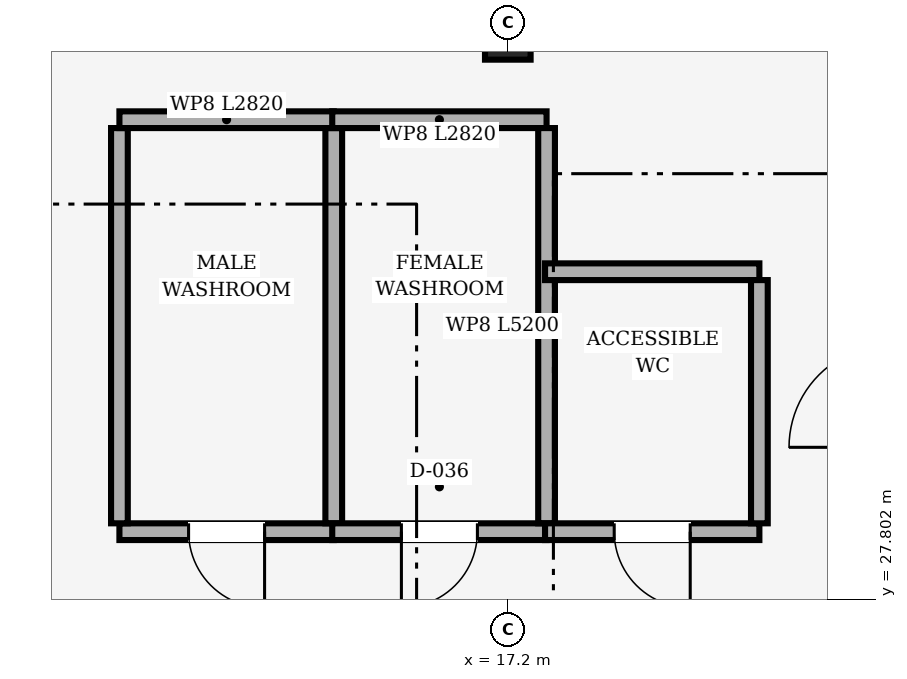
"""IFC4 building model, lengths in metres.
Left out: names, types, materials, properties, quantities, classifications, styles, units other than length and angle.
Written with IfcOpenShell. Run it as: python <this file> out.ifc"""

import sys

from ifc_helpers import new_model, si_unit, direction, frame, frame_2d, origin, origin_2d, place, context, subcontext, project, spatial, rectangle, extrude, element, fill, save


model = new_model("IFC4")
c1 = context("Model", 3, precision=1e-05, world=origin(), true_north=direction((0.0, 1.0)))
c2 = subcontext(c1, "Body", "Model", "MODEL_VIEW")
j1 = project(units=[si_unit("LENGTHUNIT", "METRE"), si_unit("PLANEANGLEUNIT", "RADIAN")], contexts=[c1])
p1 = place(None, origin())
s1 = spatial("IfcSite", under=j1, at=p1, CompositionType="ELEMENT")
p2 = place(p1, origin())
s2 = spatial("IfcBuilding", under=s1, at=p2, CompositionType="ELEMENT")
p3 = place(p2, frame((0.0, 0.0, 22.35)))
s3 = spatial("IfcBuildingStorey", under=s2, at=p3, CompositionType="ELEMENT", Elevation=22.35)
p4 = place(p3, frame((17.2, 35.2, 0.0), z_axis=(0.0, 0.0, 1.0), x_axis=(1.0, 0.0, 0.0)))
e1 = element("IfcColumn", 1, at=p4, inside=s3, PredefinedType="COLUMN", context=c2, shape_type="SweptSolid", body=[
    extrude(rectangle(XDim=0.6, YDim=0.6, at=origin_2d()), origin(), (0.0, 0.0, 1.0), 2.91),
])
p5 = place(p3, frame((14.91, 28.69, 0.0), z_axis=(0.0, 0.0, 1.0), x_axis=(-1.0, 0.0, 0.0)))
e2 = element("IfcWall", 2, at=p5, inside=s3, PredefinedType="PLUMBINGWALL", context=c2, shape_type="SweptSolid", body=[
    extrude(rectangle(XDim=2.82, YDim=0.22, at=frame_2d((1.41, 0.0))), origin(), (0.0, 0.0, 1.0), 2.89),
])
p6 = place(p5, frame((0.91, 0.0, 0.0)))
e3 = element("IfcOpeningElement", 3, at=p6, cuts=e2, PredefinedType="OPENING", context=c2, shape_type="SweptSolid", body=[
    extrude(rectangle(XDim=1.0, YDim=2.1, at=frame_2d((0.5, 1.05))), frame((0.0, 0.11, 0.0), z_axis=(0.0, -1.0, 0.0), x_axis=(1.0, 0.0, 0.0)), (0.0, 0.0, 1.0), 0.22),
])
p7 = place(p3, frame((12.09, 28.8, 0.0), z_axis=(0.0, 0.0, 1.0), x_axis=(0.0, 1.0, 0.0)))
e4 = element("IfcWall", 4, at=p7, inside=s3, PredefinedType="PLUMBINGWALL", context=c2, shape_type="SweptSolid", body=[
    extrude(rectangle(XDim=5.2, YDim=0.22, at=frame_2d((2.6, 0.0))), origin(), (0.0, 0.0, 1.0), 2.89),
])
p8 = place(p3, frame((12.09, 34.11, 0.0), z_axis=(0.0, 0.0, 1.0), x_axis=(1.0, 0.0, 0.0)))
e5 = element("IfcWall", 5, at=p8, inside=s3, PredefinedType="PLUMBINGWALL", context=c2, shape_type="SweptSolid", body=[
    extrude(rectangle(XDim=2.82, YDim=0.22, at=frame_2d((1.41, 0.0))), origin(), (0.0, 0.0, 1.0), 2.89),
])
p9 = place(p3, frame((14.91, 34.0, 0.0), z_axis=(0.0, 0.0, 1.0), x_axis=(0.0, -1.0, 0.0)))
e6 = element("IfcWall", 6, at=p9, inside=s3, PredefinedType="PLUMBINGWALL", context=c2, shape_type="SweptSolid", body=[
    extrude(rectangle(XDim=5.2, YDim=0.22, at=frame_2d((2.6, 0.0))), origin(), (0.0, 0.0, 1.0), 2.89),
])
p10 = place(p3, frame((17.71, 28.69, 0.0), z_axis=(0.0, 0.0, 1.0), x_axis=(-1.0, 0.0, 0.0)))
e7 = element("IfcWall", 7, at=p10, inside=s3, PredefinedType="PLUMBINGWALL", context=c2, shape_type="SweptSolid", body=[
    extrude(rectangle(XDim=2.82, YDim=0.22, at=frame_2d((1.41, 0.0))), origin(), (0.0, 0.0, 1.0), 2.89),
])
p11 = place(p10, frame((0.91, 0.0, 0.0)))
e8 = element("IfcOpeningElement", 8, at=p11, cuts=e7, PredefinedType="OPENING", context=c2, shape_type="SweptSolid", body=[
    extrude(rectangle(XDim=1.0, YDim=2.1, at=frame_2d((0.5, 1.05))), frame((0.0, 0.11, 0.0), z_axis=(0.0, -1.0, 0.0), x_axis=(1.0, 0.0, 0.0)), (0.0, 0.0, 1.0), 0.22),
])
p12 = place(p3, frame((14.89, 34.11, 0.0), z_axis=(0.0, 0.0, 1.0), x_axis=(1.0, 0.0, 0.0)))
e9 = element("IfcWall", 9, at=p12, inside=s3, PredefinedType="PLUMBINGWALL", context=c2, shape_type="SweptSolid", body=[
    extrude(rectangle(XDim=2.82, YDim=0.22, at=frame_2d((1.41, 0.0))), origin(), (0.0, 0.0, 1.0), 2.89),
])
p13 = place(p3, frame((17.71, 34.0, 0.0), z_axis=(0.0, 0.0, 1.0), x_axis=(0.0, -1.0, 0.0)))
e10 = element("IfcWall", 10, at=p13, inside=s3, PredefinedType="PLUMBINGWALL", context=c2, shape_type="SweptSolid", body=[
    extrude(rectangle(XDim=5.2, YDim=0.22, at=frame_2d((2.6, 0.0))), origin(), (0.0, 0.0, 1.0), 2.89),
])
p14 = place(p3, frame((20.51, 28.69, 0.0), z_axis=(0.0, 0.0, 1.0), x_axis=(-1.0, 0.0, 0.0)))
e11 = element("IfcWall", 11, at=p14, inside=s3, PredefinedType="PLUMBINGWALL", context=c2, shape_type="SweptSolid", body=[
    extrude(rectangle(XDim=2.82, YDim=0.22, at=frame_2d((1.41, 0.0))), origin(), (0.0, 0.0, 1.0), 2.89),
])
p15 = place(p14, frame((0.91, 0.0, 0.0)))
e12 = element("IfcOpeningElement", 12, at=p15, cuts=e11, PredefinedType="OPENING", context=c2, shape_type="SweptSolid", body=[
    extrude(rectangle(XDim=1.0, YDim=2.1, at=frame_2d((0.5, 1.05))), frame((0.0, 0.11, 0.0), z_axis=(0.0, -1.0, 0.0), x_axis=(1.0, 0.0, 0.0)), (0.0, 0.0, 1.0), 0.22),
])
p16 = place(p3, frame((17.69, 32.11, 0.0), z_axis=(0.0, 0.0, 1.0), x_axis=(1.0, 0.0, 0.0)))
e13 = element("IfcWall", 13, at=p16, inside=s3, PredefinedType="PLUMBINGWALL", context=c2, shape_type="SweptSolid", body=[
    extrude(rectangle(XDim=2.82, YDim=0.22, at=frame_2d((1.41, 0.0))), origin(), (0.0, 0.0, 1.0), 2.89),
])
p17 = place(p3, frame((20.51, 32.0, 0.0), z_axis=(0.0, 0.0, 1.0), x_axis=(0.0, -1.0, 0.0)))
e14 = element("IfcWall", 14, at=p17, inside=s3, PredefinedType="PLUMBINGWALL", context=c2, shape_type="SweptSolid", body=[
    extrude(rectangle(XDim=3.2, YDim=0.22, at=frame_2d((1.6, 0.0))), origin(), (0.0, 0.0, 1.0), 2.89),
])
p18 = place(p6, origin())
e15 = element("IfcDoor", 15, at=p18, inside=s3, OperationType="SINGLE_SWING_LEFT", PredefinedType="DOOR", context=c2, shape_type="SweptSolid", body=[
    extrude(rectangle(XDim=1.0, YDim=2.1, at=frame_2d((0.5, 1.05))), frame((0.0, 0.025, 0.0), z_axis=(0.0, -1.0, 0.0), x_axis=(1.0, 0.0, 0.0)), (0.0, 0.0, 1.0), 0.05),
])
fill(e3, e15)
p19 = place(p11, origin())
e16 = element("IfcDoor", 16, at=p19, inside=s3, OperationType="SINGLE_SWING_RIGHT", PredefinedType="DOOR", context=c2, shape_type="SweptSolid", body=[
    extrude(rectangle(XDim=1.0, YDim=2.1, at=frame_2d((0.5, 1.05))), frame((0.0, 0.025, 0.0), z_axis=(0.0, -1.0, 0.0), x_axis=(1.0, 0.0, 0.0)), (0.0, 0.0, 1.0), 0.05),
])
fill(e8, e16)
p20 = place(p15, origin())
e17 = element("IfcDoor", 17, at=p20, inside=s3, OperationType="SINGLE_SWING_LEFT", PredefinedType="DOOR", context=c2, shape_type="SweptSolid", body=[
    extrude(rectangle(XDim=1.0, YDim=2.1, at=frame_2d((0.5, 1.05))), frame((0.0, 0.025, 0.0), z_axis=(0.0, -1.0, 0.0), x_axis=(1.0, 0.0, 0.0)), (0.0, 0.0, 1.0), 0.05),
])
fill(e12, e17)
save(model, sys.argv[1])
